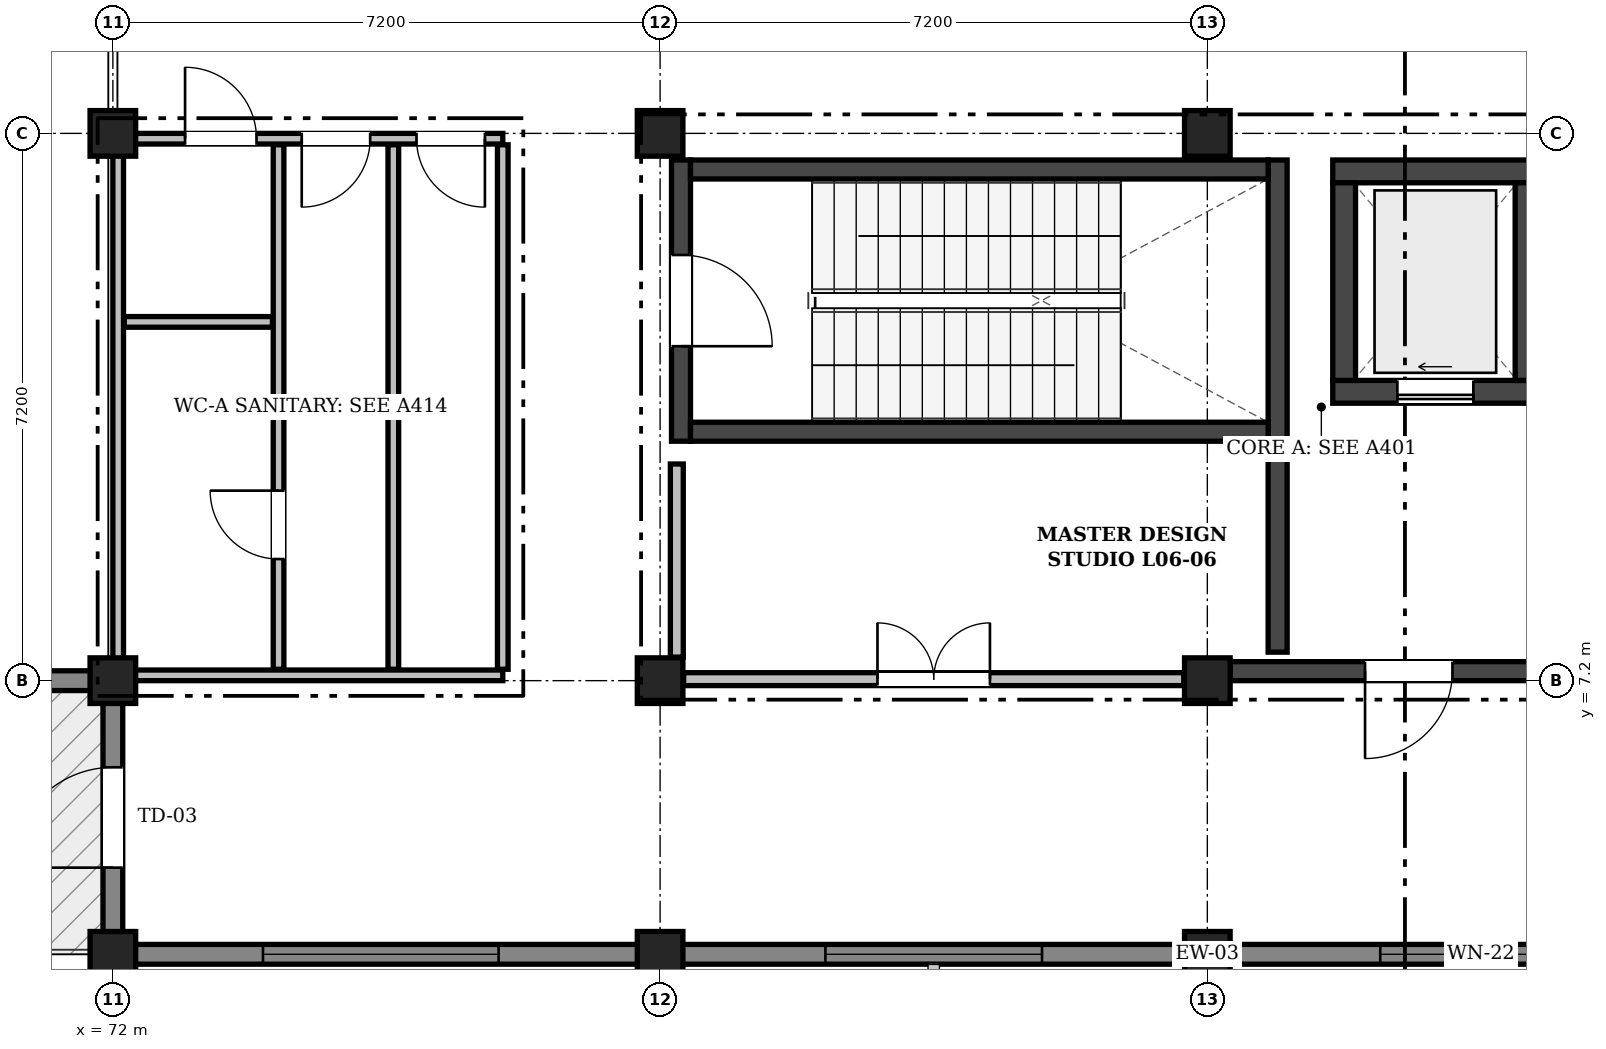
"""IFC4 building model, lengths in metres.
Left out: names, types, materials, properties, quantities, classifications, styles, units other than length and angle.
Written with IfcOpenShell. Run it as: python <this file> out.ifc"""

import sys

from ifc_helpers import new_model, si_unit, direction, frame, frame_2d, origin, origin_2d, place, context, subcontext, project, spatial, rectangle, extrude, element, fill, save


model = new_model("IFC4")
c1 = context("Model", 3, precision=1e-05, world=origin(), true_north=direction((0.0, 1.0)))
c2 = subcontext(c1, "Body", "Model", "MODEL_VIEW")
j1 = project(units=[si_unit("LENGTHUNIT", "METRE"), si_unit("PLANEANGLEUNIT", "RADIAN")], contexts=[c1])
p1 = place(None, origin())
s1 = spatial("IfcSite", under=j1, at=p1, CompositionType="ELEMENT")
p2 = place(p1, origin())
s2 = spatial("IfcBuilding", under=s1, at=p2, CompositionType="ELEMENT")
p3 = place(p2, frame((0.0, 0.0, 27.9)))
s3 = spatial("IfcBuildingStorey", under=s2, at=p3, CompositionType="ELEMENT", Elevation=27.9)
for number, where, z_axis, x_axis in (
    (1, (72.0, 3.6, 0.0), (0.0, 0.0, 1.0), (1.0, 0.0, 0.0)),
    (2, (72.0, 7.2, 0.0), (0.0, 0.0, 1.0), (1.0, 0.0, 0.0)),
    (3, (72.0, 14.4, 0.0), (0.0, 0.0, 1.0), (1.0, 0.0, 0.0)),
    (4, (79.2, 3.6, 0.0), (0.0, 0.0, 1.0), (1.0, 0.0, 0.0)),
    (5, (79.2, 7.2, 0.0), (0.0, 0.0, 1.0), (1.0, 0.0, 0.0)),
    (6, (79.2, 14.4, 0.0), (0.0, 0.0, 1.0), (1.0, 0.0, 0.0)),
    (7, (86.4, 3.6, 0.0), (0.0, 0.0, 1.0), (1.0, 0.0, 0.0)),
    (8, (86.4, 7.2, 0.0), (0.0, 0.0, 1.0), (1.0, 0.0, 0.0)),
    (9, (86.4, 14.4, 0.0), (0.0, 0.0, 1.0), (1.0, 0.0, 0.0)),
):
    element("IfcColumn", number, at=place(p3, frame(where, z_axis=z_axis, x_axis=x_axis)), inside=s3, PredefinedType="COLUMN", context=c2, shape_type="SweptSolid", body=[
        extrude(rectangle(XDim=0.6, YDim=0.6, at=origin_2d()), origin(), (0.0, 0.0, 1.0), 4.5),
    ])
p4 = place(p3, frame((93.6, 3.6, 0.0), z_axis=(0.0, 0.0, 1.0), x_axis=(-1.0, 0.0, 0.0)))
e10 = element("IfcWall", 10, at=p4, inside=s3, PredefinedType="SOLIDWALL", context=c2, shape_type="SweptSolid", body=[
    extrude(rectangle(XDim=7.2, YDim=0.26, at=frame_2d((3.6, 0.0))), origin(), (0.0, 0.0, 1.0), 4.22),
])
p5 = place(p4, frame((2.275, 0.0, 0.95)))
e11 = element("IfcOpeningElement", 11, at=p5, cuts=e10, PredefinedType="OPENING", context=c2, shape_type="SweptSolid", body=[
    extrude(rectangle(XDim=2.65, YDim=1.55, at=frame_2d((1.325, 0.775))), frame((0.0, 0.142, 0.0), z_axis=(0.0, -1.0, 0.0), x_axis=(1.0, 0.0, 0.0)), (0.0, 0.0, 1.0), 0.284),
])
p6 = place(p3, frame((86.4, 3.6, 0.0), z_axis=(0.0, 0.0, 1.0), x_axis=(-1.0, 0.0, 0.0)))
e12 = element("IfcWall", 12, at=p6, inside=s3, PredefinedType="SOLIDWALL", context=c2, shape_type="SweptSolid", body=[
    extrude(rectangle(XDim=7.2, YDim=0.26, at=frame_2d((3.6, 0.0))), origin(), (0.0, 0.0, 1.0), 4.22),
])
p7 = place(p6, frame((2.175, 0.0, 0.95)))
e13 = element("IfcOpeningElement", 13, at=p7, cuts=e12, PredefinedType="OPENING", context=c2, shape_type="SweptSolid", body=[
    extrude(rectangle(XDim=2.85, YDim=1.55, at=frame_2d((1.425, 0.775))), frame((0.0, 0.142, 0.0), z_axis=(0.0, -1.0, 0.0), x_axis=(1.0, 0.0, 0.0)), (0.0, 0.0, 1.0), 0.284),
])
p8 = place(p3, frame((79.2, 3.6, 0.0), z_axis=(0.0, 0.0, 1.0), x_axis=(-1.0, 0.0, 0.0)))
e14 = element("IfcWall", 14, at=p8, inside=s3, PredefinedType="SOLIDWALL", context=c2, shape_type="SweptSolid", body=[
    extrude(rectangle(XDim=7.35, YDim=0.26, at=frame_2d((3.675, 0.0))), origin(), (0.0, 0.0, 1.0), 4.22),
])
p9 = place(p8, frame((2.125, 0.0, 0.95)))
e15 = element("IfcOpeningElement", 15, at=p9, cuts=e14, PredefinedType="OPENING", context=c2, shape_type="SweptSolid", body=[
    extrude(rectangle(XDim=3.1, YDim=1.55, at=frame_2d((1.55, 0.775))), frame((0.0, 0.142, 0.0), z_axis=(0.0, -1.0, 0.0), x_axis=(1.0, 0.0, 0.0)), (0.0, 0.0, 1.0), 0.284),
])
p10 = place(p3, frame((72.0, 3.752, 0.0), z_axis=(0.0, 0.0, 1.0), x_axis=(0.0, 1.0, 0.0)))
e16 = element("IfcWall", 16, at=p10, inside=s3, PredefinedType="SOLIDWALL", context=c2, shape_type="SweptSolid", body=[
    extrude(rectangle(XDim=3.296, YDim=0.26, at=frame_2d((1.648, 0.0))), origin(), (0.0, 0.0, 1.0), 4.22),
])
p11 = place(p10, frame((0.988, 0.0, 0.0)))
e17 = element("IfcOpeningElement", 17, at=p11, cuts=e16, PredefinedType="OPENING", context=c2, shape_type="SweptSolid", body=[
    extrude(rectangle(XDim=1.32, YDim=2.2, at=frame_2d((0.66, 1.1))), frame((0.0, 0.142, 0.0), z_axis=(0.0, -1.0, 0.0), x_axis=(1.0, 0.0, 0.0)), (0.0, 0.0, 1.0), 0.284),
])
p12 = place(p3, frame((72.15, 7.2, 0.0), z_axis=(0.0, 0.0, 1.0), x_axis=(-1.0, 0.0, 0.0)))
e18 = element("IfcWall", 18, at=p12, inside=s3, PredefinedType="SOLIDWALL", context=c2, shape_type="SweptSolid", body=[
    extrude(rectangle(XDim=7.35, YDim=0.26, at=frame_2d((3.675, 0.0))), origin(), (0.0, 0.0, 1.0), 4.22),
])
p13 = place(p12, frame((3.09, 0.0, 0.0)))
e19 = element("IfcOpeningElement", 19, at=p13, cuts=e18, PredefinedType="OPENING", context=c2, shape_type="SweptSolid", body=[
    extrude(rectangle(XDim=1.32, YDim=2.2, at=frame_2d((0.66, 1.1))), frame((0.0, 0.142, 0.0), z_axis=(0.0, -1.0, 0.0), x_axis=(1.0, 0.0, 0.0)), (0.0, 0.0, 1.0), 0.284),
])
p14 = place(p3, frame((88.05, 11.0, 0.0), z_axis=(0.0, 0.0, 1.0), x_axis=(1.0, 0.0, 0.0)))
e20 = element("IfcWall", 20, at=p14, inside=s3, PredefinedType="SHEAR", context=c2, shape_type="SweptSolid", body=[
    extrude(rectangle(XDim=2.7, YDim=0.3, at=frame_2d((1.35, 0.0))), origin(), (0.0, 0.0, 1.0), 4.25),
])
p15 = place(p14, frame((0.85, 0.0, 0.0)))
e21 = element("IfcOpeningElement", 21, at=p15, cuts=e20, PredefinedType="OPENING", context=c2, shape_type="SweptSolid", body=[
    extrude(rectangle(XDim=1.0, YDim=2.1, at=frame_2d((0.5, 1.05))), frame((0.0, 0.162, 0.0), z_axis=(0.0, -1.0, 0.0), x_axis=(1.0, 0.0, 0.0)), (0.0, 0.0, 1.0), 0.324),
])
p16 = place(p3, frame((88.05, 13.9, 0.0), z_axis=(0.0, 0.0, 1.0), x_axis=(1.0, 0.0, 0.0)))
e22 = element("IfcWall", 22, at=p16, inside=s3, PredefinedType="SHEAR", context=c2, shape_type="SweptSolid", body=[
    extrude(rectangle(XDim=2.7, YDim=0.3, at=frame_2d((1.35, 0.0))), origin(), (0.0, 0.0, 1.0), 4.25),
])
for number, where, z_axis, x_axis in (
    (23, (88.2, 11.15, 0.0), (0.0, 0.0, 1.0), (0.0, 1.0, 0.0)),
    (24, (90.6, 11.15, 0.0), (0.0, 0.0, 1.0), (0.0, 1.0, 0.0)),
):
    element("IfcWall", number, at=place(p3, frame(where, z_axis=z_axis, x_axis=x_axis)), inside=s3, PredefinedType="SHEAR", context=c2, shape_type="SweptSolid", body=[
        extrude(rectangle(XDim=2.6, YDim=0.3, at=frame_2d((1.3, 0.0))), origin(), (0.0, 0.0, 1.0), 4.25),
    ])
p17 = place(p3, frame((79.475, 10.35, 0.0), z_axis=(0.0, 0.0, 1.0), x_axis=(0.0, 1.0, 0.0)))
e25 = element("IfcWall", 25, at=p17, inside=s3, PredefinedType="SHEAR", context=c2, shape_type="SweptSolid", body=[
    extrude(rectangle(XDim=3.7, YDim=0.25, at=frame_2d((1.85, 0.0))), origin(), (0.0, 0.0, 1.0), 4.25),
])
p18 = place(p17, frame((1.25, 0.0, 0.0)))
e26 = element("IfcOpeningElement", 26, at=p18, cuts=e25, PredefinedType="OPENING", context=c2, shape_type="SweptSolid", body=[
    extrude(rectangle(XDim=1.2, YDim=2.15, at=frame_2d((0.6, 1.075))), frame((0.0, 0.137, 0.0), z_axis=(0.0, -1.0, 0.0), x_axis=(1.0, 0.0, 0.0)), (0.0, 0.0, 1.0), 0.274),
])
p19 = place(p3, frame((87.325, 10.35, 0.0), z_axis=(0.0, 0.0, 1.0), x_axis=(0.0, 1.0, 0.0)))
e27 = element("IfcWall", 27, at=p19, inside=s3, PredefinedType="SHEAR", context=c2, shape_type="SweptSolid", body=[
    extrude(rectangle(XDim=3.7, YDim=0.25, at=frame_2d((1.85, 0.0))), origin(), (0.0, 0.0, 1.0), 4.25),
])
for number, where, z_axis, x_axis in (
    (28, (79.6, 10.475, 0.0), (0.0, 0.0, 1.0), (1.0, 0.0, 0.0)),
    (29, (79.6, 13.925, 0.0), (0.0, 0.0, 1.0), (1.0, 0.0, 0.0)),
):
    element("IfcWall", number, at=place(p3, frame(where, z_axis=z_axis, x_axis=x_axis)), inside=s3, PredefinedType="SHEAR", context=c2, shape_type="SweptSolid", body=[
        extrude(rectangle(XDim=7.6, YDim=0.25, at=frame_2d((3.8, 0.0))), origin(), (0.0, 0.0, 1.0), 4.25),
    ])
p20 = place(p3, frame((86.7, 7.325, 0.0), z_axis=(0.0, 0.0, 1.0), x_axis=(1.0, 0.0, 0.0)))
e30 = element("IfcWall", 30, at=p20, inside=s3, PredefinedType="SHEAR", context=c2, shape_type="SweptSolid", body=[
    extrude(rectangle(XDim=4.275, YDim=0.25, at=frame_2d((2.138, 0.0))), origin(), (0.0, 0.0, 1.0), 4.25),
])
p21 = place(p20, frame((1.775, 0.0, 0.0)))
e31 = element("IfcOpeningElement", 31, at=p21, cuts=e30, PredefinedType="OPENING", context=c2, shape_type="SweptSolid", body=[
    extrude(rectangle(XDim=1.15, YDim=2.15, at=frame_2d((0.575, 1.075))), frame((0.0, 0.137, 0.0), z_axis=(0.0, -1.0, 0.0), x_axis=(1.0, 0.0, 0.0)), (0.0, 0.0, 1.0), 0.274),
])
p22 = place(p3, frame((87.325, 7.575, 0.0), z_axis=(0.0, 0.0, 1.0), x_axis=(0.0, 1.0, 0.0)))
e32 = element("IfcWall", 32, at=p22, inside=s3, PredefinedType="SHEAR", context=c2, shape_type="SweptSolid", body=[
    extrude(rectangle(XDim=2.77, YDim=0.25, at=frame_2d((1.385, 0.0))), origin(), (0.0, 0.0, 1.0), 4.25),
])
p23 = place(p3, frame((72.07, 7.27, 0.0), z_axis=(0.0, 0.0, 1.0), x_axis=(1.0, 0.0, 0.0)))
e33 = element("IfcWall", 33, at=p23, inside=s3, PredefinedType="PARTITIONING", context=c2, shape_type="SweptSolid", body=[
    extrude(rectangle(XDim=5.06, YDim=0.14, at=frame_2d((2.53, 0.0))), origin(), (0.0, 0.0, 1.0), 3.8),
])
p24 = place(p3, frame((72.07, 14.33, 0.0), z_axis=(0.0, 0.0, 1.0), x_axis=(1.0, 0.0, 0.0)))
e34 = element("IfcWall", 34, at=p24, inside=s3, PredefinedType="PARTITIONING", context=c2, shape_type="SweptSolid", body=[
    extrude(rectangle(XDim=5.06, YDim=0.14, at=frame_2d((2.53, 0.0))), origin(), (0.0, 0.0, 1.0), 3.8),
])
p25 = place(p24, frame((0.88, 0.0, 0.0)))
e35 = element("IfcOpeningElement", 35, at=p25, cuts=e34, PredefinedType="OPENING", context=c2, shape_type="SweptSolid", body=[
    extrude(rectangle(XDim=0.94, YDim=2.1, at=frame_2d((0.47, 1.05))), frame((0.0, 0.082, 0.0), z_axis=(0.0, -1.0, 0.0), x_axis=(1.0, 0.0, 0.0)), (0.0, 0.0, 1.0), 0.164),
])
p26 = place(p24, frame((2.415, 0.0, 0.0)))
e36 = element("IfcOpeningElement", 36, at=p26, cuts=e34, PredefinedType="OPENING", context=c2, shape_type="SweptSolid", body=[
    extrude(rectangle(XDim=0.9, YDim=2.08, at=frame_2d((0.45, 1.04))), frame((0.0, 0.082, 0.0), z_axis=(0.0, -1.0, 0.0), x_axis=(1.0, 0.0, 0.0)), (0.0, 0.0, 1.0), 0.164),
])
p27 = place(p24, frame((3.925, 0.0, 0.0)))
e37 = element("IfcOpeningElement", 37, at=p27, cuts=e34, PredefinedType="OPENING", context=c2, shape_type="SweptSolid", body=[
    extrude(rectangle(XDim=0.9, YDim=2.08, at=frame_2d((0.45, 1.04))), frame((0.0, 0.082, 0.0), z_axis=(0.0, -1.0, 0.0), x_axis=(1.0, 0.0, 0.0)), (0.0, 0.0, 1.0), 0.164),
])
p28 = place(p3, frame((72.07, 7.35, 0.0), z_axis=(0.0, 0.0, 1.0), x_axis=(0.0, 1.0, 0.0)))
e38 = element("IfcWall", 38, at=p28, inside=s3, PredefinedType="PARTITIONING", context=c2, shape_type="SweptSolid", body=[
    extrude(rectangle(XDim=6.9, YDim=0.14, at=frame_2d((3.45, 0.0))), origin(), (0.0, 0.0, 1.0), 3.78),
])
p29 = place(p3, frame((77.13, 7.35, 0.0), z_axis=(0.0, 0.0, 1.0), x_axis=(0.0, 1.0, 0.0)))
e39 = element("IfcWall", 39, at=p29, inside=s3, PredefinedType="PARTITIONING", context=c2, shape_type="SweptSolid", body=[
    extrude(rectangle(XDim=6.9, YDim=0.14, at=frame_2d((3.45, 0.0))), origin(), (0.0, 0.0, 1.0), 4.16),
])
p30 = place(p3, frame((74.18, 7.35, 0.0), z_axis=(0.0, 0.0, 1.0), x_axis=(0.0, 1.0, 0.0)))
e40 = element("IfcWall", 40, at=p30, inside=s3, PredefinedType="PARTITIONING", context=c2, shape_type="SweptSolid", body=[
    extrude(rectangle(XDim=6.9, YDim=0.14, at=frame_2d((3.45, 0.0))), origin(), (0.0, 0.0, 1.0), 4.16),
])
p31 = place(p30, frame((1.45, 0.0, 0.0)))
e41 = element("IfcOpeningElement", 41, at=p31, cuts=e40, PredefinedType="OPENING", context=c2, shape_type="SweptSolid", body=[
    extrude(rectangle(XDim=0.9, YDim=2.08, at=frame_2d((0.45, 1.04))), frame((0.0, 0.082, 0.0), z_axis=(0.0, -1.0, 0.0), x_axis=(1.0, 0.0, 0.0)), (0.0, 0.0, 1.0), 0.164),
])
p32 = place(p3, frame((75.69, 7.35, 0.0), z_axis=(0.0, 0.0, 1.0), x_axis=(0.0, 1.0, 0.0)))
e42 = element("IfcWall", 42, at=p32, inside=s3, PredefinedType="PARTITIONING", context=c2, shape_type="SweptSolid", body=[
    extrude(rectangle(XDim=6.9, YDim=0.14, at=frame_2d((3.45, 0.0))), origin(), (0.0, 0.0, 1.0), 4.16),
])
p33 = place(p3, frame((72.15, 11.92, 0.0), z_axis=(0.0, 0.0, 1.0), x_axis=(1.0, 0.0, 0.0)))
e43 = element("IfcWall", 43, at=p33, inside=s3, PredefinedType="PARTITIONING", context=c2, shape_type="SweptSolid", body=[
    extrude(rectangle(XDim=1.95, YDim=0.14, at=frame_2d((0.975, 0.0))), origin(), (0.0, 0.0, 1.0), 4.16),
])
p34 = place(p3, frame((79.42, 7.51, 0.0), z_axis=(0.0, 0.0, 1.0), x_axis=(0.0, 1.0, 0.0)))
e44 = element("IfcWall", 44, at=p34, inside=s3, PredefinedType="PARTITIONING", context=c2, shape_type="SweptSolid", body=[
    extrude(rectangle(XDim=2.54, YDim=0.17, at=frame_2d((1.27, 0.0))), origin(), (0.0, 0.0, 1.0), 3.78),
])
p35 = place(p3, frame((79.51, 7.22, 0.0), z_axis=(0.0, 0.0, 1.0), x_axis=(1.0, 0.0, 0.0)))
e45 = element("IfcWall", 45, at=p35, inside=s3, PredefinedType="PARTITIONING", context=c2, shape_type="SweptSolid", body=[
    extrude(rectangle(XDim=6.58, YDim=0.17, at=frame_2d((3.29, 0.0))), origin(), (0.0, 0.0, 1.0), 3.8),
])
p36 = place(p35, frame((2.55, 0.0, 0.0)))
e46 = element("IfcOpeningElement", 46, at=p36, cuts=e45, PredefinedType="OPENING", context=c2, shape_type="SweptSolid", body=[
    extrude(rectangle(XDim=1.48, YDim=2.26, at=frame_2d((0.74, 1.13))), frame((0.0, 0.097, 0.0), z_axis=(0.0, -1.0, 0.0), x_axis=(1.0, 0.0, 0.0)), (0.0, 0.0, 1.0), 0.194),
])
p37 = place(p5, origin())
e47 = element("IfcWindow", 47, at=p37, inside=s3, PartitioningType="SINGLE_PANEL", PredefinedType="WINDOW", context=c2, shape_type="SweptSolid", body=[
    extrude(rectangle(XDim=2.65, YDim=1.55, at=frame_2d((1.325, 0.775))), frame((0.0, 0.03, 0.0), z_axis=(0.0, -1.0, 0.0), x_axis=(1.0, 0.0, 0.0)), (0.0, 0.0, 1.0), 0.06),
])
fill(e11, e47)
p38 = place(p7, origin())
e48 = element("IfcWindow", 48, at=p38, inside=s3, PartitioningType="SINGLE_PANEL", PredefinedType="WINDOW", context=c2, shape_type="SweptSolid", body=[
    extrude(rectangle(XDim=2.85, YDim=1.55, at=frame_2d((1.425, 0.775))), frame((0.0, 0.03, 0.0), z_axis=(0.0, -1.0, 0.0), x_axis=(1.0, 0.0, 0.0)), (0.0, 0.0, 1.0), 0.06),
])
fill(e13, e48)
p39 = place(p9, origin())
e49 = element("IfcWindow", 49, at=p39, inside=s3, PartitioningType="SINGLE_PANEL", PredefinedType="WINDOW", context=c2, shape_type="SweptSolid", body=[
    extrude(rectangle(XDim=3.1, YDim=1.55, at=frame_2d((1.55, 0.775))), frame((0.0, 0.03, 0.0), z_axis=(0.0, -1.0, 0.0), x_axis=(1.0, 0.0, 0.0)), (0.0, 0.0, 1.0), 0.06),
])
fill(e15, e49)
p40 = place(p11, origin())
e50 = element("IfcDoor", 50, at=p40, inside=s3, OperationType="SINGLE_SWING_LEFT", PredefinedType="DOOR", context=c2, shape_type="SweptSolid", body=[
    extrude(rectangle(XDim=1.32, YDim=2.2, at=frame_2d((0.66, 1.1))), frame((0.0, 0.025, 0.0), z_axis=(0.0, -1.0, 0.0), x_axis=(1.0, 0.0, 0.0)), (0.0, 0.0, 1.0), 0.05),
])
fill(e17, e50)
p41 = place(p15, frame((1.0, 0.0, 0.0), z_axis=(0.0, 0.0, 1.0), x_axis=(-1.0, 0.0, 0.0)))
e51 = element("IfcDoor", 51, at=p41, inside=s3, OperationType="SLIDING_TO_LEFT", PredefinedType="DOOR", context=c2, shape_type="SweptSolid", body=[
    extrude(rectangle(XDim=1.0, YDim=2.1, at=frame_2d((0.5, 1.05))), frame((0.0, 0.025, 0.0), z_axis=(0.0, -1.0, 0.0), x_axis=(1.0, 0.0, 0.0)), (0.0, 0.0, 1.0), 0.05),
])
fill(e21, e51)
p42 = place(p18, frame((1.2, 0.0, 0.0), z_axis=(0.0, 0.0, 1.0), x_axis=(-1.0, 0.0, 0.0)))
e52 = element("IfcDoor", 52, at=p42, inside=s3, OperationType="SINGLE_SWING_RIGHT", PredefinedType="DOOR", context=c2, shape_type="SweptSolid", body=[
    extrude(rectangle(XDim=1.2, YDim=2.15, at=frame_2d((0.6, 1.075))), frame((0.0, 0.025, 0.0), z_axis=(0.0, -1.0, 0.0), x_axis=(1.0, 0.0, 0.0)), (0.0, 0.0, 1.0), 0.05),
])
fill(e26, e52)
p43 = place(p21, frame((1.15, 0.0, 0.0), z_axis=(0.0, 0.0, 1.0), x_axis=(-1.0, 0.0, 0.0)))
e53 = element("IfcDoor", 53, at=p43, inside=s3, OperationType="SINGLE_SWING_RIGHT", PredefinedType="DOOR", context=c2, shape_type="SweptSolid", body=[
    extrude(rectangle(XDim=1.15, YDim=2.15, at=frame_2d((0.575, 1.075))), frame((0.0, 0.025, 0.0), z_axis=(0.0, -1.0, 0.0), x_axis=(1.0, 0.0, 0.0)), (0.0, 0.0, 1.0), 0.05),
])
fill(e31, e53)
p44 = place(p25, origin())
e54 = element("IfcDoor", 54, at=p44, inside=s3, OperationType="SINGLE_SWING_LEFT", PredefinedType="DOOR", context=c2, shape_type="SweptSolid", body=[
    extrude(rectangle(XDim=0.94, YDim=2.1, at=frame_2d((0.47, 1.05))), frame((0.0, 0.025, 0.0), z_axis=(0.0, -1.0, 0.0), x_axis=(1.0, 0.0, 0.0)), (0.0, 0.0, 1.0), 0.05),
])
fill(e35, e54)
p45 = place(p26, frame((0.9, 0.0, 0.0), z_axis=(0.0, 0.0, 1.0), x_axis=(-1.0, 0.0, 0.0)))
e55 = element("IfcDoor", 55, at=p45, inside=s3, OperationType="SINGLE_SWING_RIGHT", PredefinedType="DOOR", context=c2, shape_type="SweptSolid", body=[
    extrude(rectangle(XDim=0.9, YDim=2.08, at=frame_2d((0.45, 1.04))), frame((0.0, 0.025, 0.0), z_axis=(0.0, -1.0, 0.0), x_axis=(1.0, 0.0, 0.0)), (0.0, 0.0, 1.0), 0.05),
])
fill(e36, e55)
p46 = place(p27, frame((0.9, 0.0, 0.0), z_axis=(0.0, 0.0, 1.0), x_axis=(-1.0, 0.0, 0.0)))
e56 = element("IfcDoor", 56, at=p46, inside=s3, OperationType="SINGLE_SWING_LEFT", PredefinedType="DOOR", context=c2, shape_type="SweptSolid", body=[
    extrude(rectangle(XDim=0.9, YDim=2.08, at=frame_2d((0.45, 1.04))), frame((0.0, 0.025, 0.0), z_axis=(0.0, -1.0, 0.0), x_axis=(1.0, 0.0, 0.0)), (0.0, 0.0, 1.0), 0.05),
])
fill(e37, e56)
p47 = place(p31, origin())
e57 = element("IfcDoor", 57, at=p47, inside=s3, OperationType="SINGLE_SWING_RIGHT", PredefinedType="DOOR", context=c2, shape_type="SweptSolid", body=[
    extrude(rectangle(XDim=0.9, YDim=2.08, at=frame_2d((0.45, 1.04))), frame((0.0, 0.025, 0.0), z_axis=(0.0, -1.0, 0.0), x_axis=(1.0, 0.0, 0.0)), (0.0, 0.0, 1.0), 0.05),
])
fill(e41, e57)
p48 = place(p36, origin())
e58 = element("IfcDoor", 58, at=p48, inside=s3, OperationType="DOUBLE_DOOR_SINGLE_SWING", PredefinedType="DOOR", context=c2, shape_type="SweptSolid", body=[
    extrude(rectangle(XDim=1.48, YDim=2.26, at=frame_2d((0.74, 1.13))), frame((0.0, 0.025, 0.0), z_axis=(0.0, -1.0, 0.0), x_axis=(1.0, 0.0, 0.0)), (0.0, 0.0, 1.0), 0.05),
])
fill(e46, e58)
save(model, sys.argv[1])
